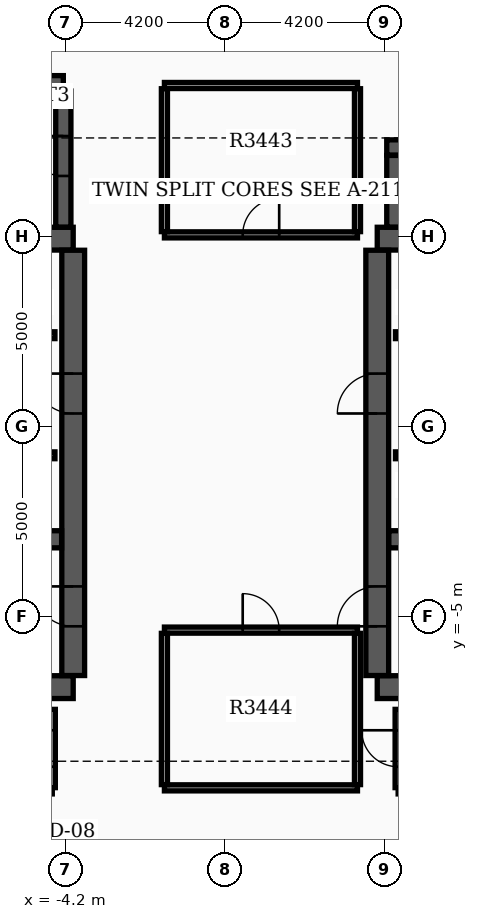
"""IFC4 building model, lengths in metres.
Left out: names, types, materials, properties, quantities, classifications, styles, units other than length and angle.
Written with IfcOpenShell. Run it as: python <this file> out.ifc"""

import sys

from ifc_helpers import new_model, si_unit, direction, frame, frame_2d, origin, place, context, subcontext, project, spatial, rectangle, extrude, element, fill, save


model = new_model("IFC4")
c1 = context("Model", 3, precision=1e-05, world=origin(), true_north=direction((0.0, 1.0)))
c2 = subcontext(c1, "Body", "Model", "MODEL_VIEW")
j1 = project(units=[si_unit("LENGTHUNIT", "METRE"), si_unit("PLANEANGLEUNIT", "RADIAN")], contexts=[c1])
p1 = place(None, origin())
s1 = spatial("IfcSite", under=j1, at=p1, CompositionType="ELEMENT")
p2 = place(p1, origin())
s2 = spatial("IfcBuilding", under=s1, at=p2, CompositionType="ELEMENT")
p3 = place(p2, frame((0.0, 0.0, 216.9)))
s3 = spatial("IfcBuildingStorey", under=s2, at=p3, CompositionType="ELEMENT", Elevation=216.9)
for number, where, z_axis, x_axis in (
    (1, (-12.4, -6.85, 0.0), (0.0, 0.0, 1.0), (1.0, 0.0, 0.0)),
    (2, (-12.4, 4.95, 0.0), (0.0, 0.0, 1.0), (1.0, 0.0, 0.0)),
):
    element("IfcWall", number, at=place(p3, frame(where, z_axis=z_axis, x_axis=x_axis)), inside=s3, PredefinedType="SHEAR", context=c2, shape_type="SweptSolid", body=[
        extrude(rectangle(XDim=8.4, YDim=0.6, at=frame_2d((4.2, 0.0))), origin(), (0.0, 0.0, 1.0), 3.7),
    ])
p4 = place(p3, frame((-4.0, -6.545, 0.0), z_axis=(0.0, 0.0, 1.0), x_axis=(0.0, 1.0, 0.0)))
e3 = element("IfcWall", 3, at=p4, inside=s3, PredefinedType="SHEAR", context=c2, shape_type="SweptSolid", body=[
    extrude(rectangle(XDim=11.19, YDim=0.6, at=frame_2d((5.595, 0.0))), origin(), (0.0, 0.0, 1.0), 3.7),
])
p5 = place(p4, frame((1.295, 0.0, 0.0)))
e4 = element("IfcOpeningElement", 4, at=p5, cuts=e3, PredefinedType="OPENING", context=c2, shape_type="SweptSolid", body=[
    extrude(rectangle(XDim=1.05, YDim=2.15, at=frame_2d((0.525, 1.075))), frame((0.0, 0.31, 0.0), z_axis=(0.0, -1.0, 0.0), x_axis=(1.0, 0.0, 0.0)), (0.0, 0.0, 1.0), 0.62),
])
p6 = place(p4, frame((6.895, 0.0, 0.0)))
e5 = element("IfcOpeningElement", 5, at=p6, cuts=e3, PredefinedType="OPENING", context=c2, shape_type="SweptSolid", body=[
    extrude(rectangle(XDim=1.05, YDim=2.15, at=frame_2d((0.525, 1.075))), frame((0.0, 0.31, 0.0), z_axis=(0.0, -1.0, 0.0), x_axis=(1.0, 0.0, 0.0)), (0.0, 0.0, 1.0), 0.62),
])
p7 = place(p3, frame((-12.095, -2.96, 0.0), z_axis=(0.0, 0.0, 1.0), x_axis=(1.0, 0.0, 0.0)))
e6 = element("IfcWall", 6, at=p7, inside=s3, PredefinedType="SHEAR", context=c2, shape_type="SweptSolid", body=[
    extrude(rectangle(XDim=7.79, YDim=0.45, at=frame_2d((3.895, 0.0))), origin(), (0.0, 0.0, 1.0), 3.7),
])
for number, where, z_axis, x_axis in (
    (7, (4.0, -6.85, 0.0), (0.0, 0.0, 1.0), (1.0, 0.0, 0.0)),
    (8, (4.0, 4.95, 0.0), (0.0, 0.0, 1.0), (1.0, 0.0, 0.0)),
):
    element("IfcWall", number, at=place(p3, frame(where, z_axis=z_axis, x_axis=x_axis)), inside=s3, PredefinedType="SHEAR", context=c2, shape_type="SweptSolid", body=[
        extrude(rectangle(XDim=8.4, YDim=0.6, at=frame_2d((4.2, 0.0))), origin(), (0.0, 0.0, 1.0), 3.7),
    ])
p8 = place(p3, frame((4.0, -6.545, 0.0), z_axis=(0.0, 0.0, 1.0), x_axis=(0.0, 1.0, 0.0)))
e9 = element("IfcWall", 9, at=p8, inside=s3, PredefinedType="SHEAR", context=c2, shape_type="SweptSolid", body=[
    extrude(rectangle(XDim=11.19, YDim=0.6, at=frame_2d((5.595, 0.0))), origin(), (0.0, 0.0, 1.0), 3.7),
])
p9 = place(p8, frame((1.295, 0.0, 0.0)))
e10 = element("IfcOpeningElement", 10, at=p9, cuts=e9, PredefinedType="OPENING", context=c2, shape_type="SweptSolid", body=[
    extrude(rectangle(XDim=1.05, YDim=2.15, at=frame_2d((0.525, 1.075))), frame((0.0, 0.31, 0.0), z_axis=(0.0, -1.0, 0.0), x_axis=(1.0, 0.0, 0.0)), (0.0, 0.0, 1.0), 0.62),
])
p10 = place(p8, frame((6.895, 0.0, 0.0)))
e11 = element("IfcOpeningElement", 11, at=p10, cuts=e9, PredefinedType="OPENING", context=c2, shape_type="SweptSolid", body=[
    extrude(rectangle(XDim=1.05, YDim=2.15, at=frame_2d((0.525, 1.075))), frame((0.0, 0.31, 0.0), z_axis=(0.0, -1.0, 0.0), x_axis=(1.0, 0.0, 0.0)), (0.0, 0.0, 1.0), 0.62),
])
p11 = place(p3, frame((4.305, -2.96, 0.0), z_axis=(0.0, 0.0, 1.0), x_axis=(1.0, 0.0, 0.0)))
e12 = element("IfcWall", 12, at=p11, inside=s3, PredefinedType="SHEAR", context=c2, shape_type="SweptSolid", body=[
    extrude(rectangle(XDim=7.79, YDim=0.45, at=frame_2d((3.895, 0.0))), origin(), (0.0, 0.0, 1.0), 3.7),
])
p12 = place(p3, frame((-12.22, 9.04, 0.0), z_axis=(0.0, 0.0, 1.0), x_axis=(1.0, 0.0, 0.0)))
e13 = element("IfcWall", 13, at=p12, inside=s3, PredefinedType="SHEAR", context=c2, shape_type="SweptSolid", body=[
    extrude(rectangle(XDim=7.96, YDim=0.4, at=frame_2d((3.98, 0.0))), origin(), (0.0, 0.0, 1.0), 3.7),
])
p13 = place(p3, frame((-4.26, 5.255, 0.0), z_axis=(0.0, 0.0, 1.0), x_axis=(0.0, 1.0, 0.0)))
e14 = element("IfcWall", 14, at=p13, inside=s3, PredefinedType="SHEAR", context=c2, shape_type="SweptSolid", body=[
    extrude(rectangle(XDim=3.58, YDim=0.4, at=frame_2d((1.79, 0.0))), origin(), (0.0, 0.0, 1.0), 3.7),
])
p14 = place(p13, frame((1.345, 0.0, 0.0)))
e15 = element("IfcOpeningElement", 15, at=p14, cuts=e14, PredefinedType="OPENING", context=c2, shape_type="SweptSolid", body=[
    extrude(rectangle(XDim=1.05, YDim=2.15, at=frame_2d((0.525, 1.075))), frame((0.0, 0.21, 0.0), z_axis=(0.0, -1.0, 0.0), x_axis=(1.0, 0.0, 0.0)), (0.0, 0.0, 1.0), 0.42),
])
p15 = place(p3, frame((4.45, 5.255, 0.0), z_axis=(0.0, 0.0, 1.0), x_axis=(0.0, 1.0, 0.0)))
e16 = element("IfcWall", 16, at=p15, inside=s3, PredefinedType="SHEAR", context=c2, shape_type="SweptSolid", body=[
    extrude(rectangle(XDim=1.885, YDim=0.4, at=frame_2d((0.942, 0.0))), origin(), (0.0, 0.0, 1.0), 3.7),
])
p16 = place(p3, frame((4.25, 7.35, 0.0), z_axis=(0.0, 0.0, 1.0), x_axis=(1.0, 0.0, 0.0)))
e17 = element("IfcWall", 17, at=p16, inside=s3, PredefinedType="SHEAR", context=c2, shape_type="SweptSolid", body=[
    extrude(rectangle(XDim=5.4, YDim=0.4, at=frame_2d((2.7, 0.0))), origin(), (0.0, 0.0, 1.0), 3.7),
])
p17 = place(p3, frame((-11.9, 2.41, 0.0), z_axis=(0.0, 0.0, 1.0), x_axis=(1.0, 0.0, 0.0)))
e18 = element("IfcWall", 18, at=p17, inside=s3, PredefinedType="SOLIDWALL", context=c2, shape_type="SweptSolid", body=[
    extrude(rectangle(XDim=7.42, YDim=0.18, at=frame_2d((3.71, 0.0))), origin(), (0.0, 0.0, 1.0), 3.17),
])
p18 = place(p17, frame((0.55, 0.0, 0.0)))
e19 = element("IfcOpeningElement", 19, at=p18, cuts=e18, PredefinedType="OPENING", context=c2, shape_type="SweptSolid", body=[
    extrude(rectangle(XDim=1.1, YDim=2.15, at=frame_2d((0.55, 1.075))), frame((0.0, 0.1, 0.0), z_axis=(0.0, -1.0, 0.0), x_axis=(1.0, 0.0, 0.0)), (0.0, 0.0, 1.0), 0.2),
])
p19 = place(p17, frame((4.9, 0.0, 0.0)))
e20 = element("IfcOpeningElement", 20, at=p19, cuts=e18, PredefinedType="OPENING", context=c2, shape_type="SweptSolid", body=[
    extrude(rectangle(XDim=0.88, YDim=2.1, at=frame_2d((0.44, 1.05))), frame((0.0, 0.1, 0.0), z_axis=(0.0, -1.0, 0.0), x_axis=(1.0, 0.0, 0.0)), (0.0, 0.0, 1.0), 0.2),
])
p20 = place(p3, frame((4.48, 2.41, 0.0), z_axis=(0.0, 0.0, 1.0), x_axis=(1.0, 0.0, 0.0)))
e21 = element("IfcWall", 21, at=p20, inside=s3, PredefinedType="SOLIDWALL", context=c2, shape_type="SweptSolid", body=[
    extrude(rectangle(XDim=7.42, YDim=0.18, at=frame_2d((3.71, 0.0))), origin(), (0.0, 0.0, 1.0), 3.17),
])
p21 = place(p20, frame((5.67, 0.0, 0.0)))
e22 = element("IfcOpeningElement", 22, at=p21, cuts=e21, PredefinedType="OPENING", context=c2, shape_type="SweptSolid", body=[
    extrude(rectangle(XDim=1.1, YDim=2.15, at=frame_2d((0.55, 1.075))), frame((0.0, 0.1, 0.0), z_axis=(0.0, -1.0, 0.0), x_axis=(1.0, 0.0, 0.0)), (0.0, 0.0, 1.0), 0.2),
])
p22 = place(p20, frame((1.6, 0.0, 0.0)))
e23 = element("IfcOpeningElement", 23, at=p22, cuts=e21, PredefinedType="OPENING", context=c2, shape_type="SweptSolid", body=[
    extrude(rectangle(XDim=0.88, YDim=2.1, at=frame_2d((0.44, 1.05))), frame((0.0, 0.1, 0.0), z_axis=(0.0, -1.0, 0.0), x_axis=(1.0, 0.0, 0.0)), (0.0, 0.0, 1.0), 0.2),
])
p23 = place(p3, frame((-11.9, -0.75, 0.0), z_axis=(0.0, 0.0, 1.0), x_axis=(1.0, 0.0, 0.0)))
e24 = element("IfcWall", 24, at=p23, inside=s3, PredefinedType="SOLIDWALL", context=c2, shape_type="SweptSolid", body=[
    extrude(rectangle(XDim=7.42, YDim=0.18, at=frame_2d((3.71, 0.0))), origin(), (0.0, 0.0, 1.0), 3.17),
])
p24 = place(p23, frame((5.75, 0.0, 0.0)))
e25 = element("IfcOpeningElement", 25, at=p24, cuts=e24, PredefinedType="OPENING", context=c2, shape_type="SweptSolid", body=[
    extrude(rectangle(XDim=1.1, YDim=2.15, at=frame_2d((0.55, 1.075))), frame((0.0, 0.1, 0.0), z_axis=(0.0, -1.0, 0.0), x_axis=(1.0, 0.0, 0.0)), (0.0, 0.0, 1.0), 0.2),
])
p25 = place(p23, frame((1.6, 0.0, 0.0)))
e26 = element("IfcOpeningElement", 26, at=p25, cuts=e24, PredefinedType="OPENING", context=c2, shape_type="SweptSolid", body=[
    extrude(rectangle(XDim=0.88, YDim=2.1, at=frame_2d((0.44, 1.05))), frame((0.0, 0.1, 0.0), z_axis=(0.0, -1.0, 0.0), x_axis=(1.0, 0.0, 0.0)), (0.0, 0.0, 1.0), 0.2),
])
p26 = place(p3, frame((4.48, -0.75, 0.0), z_axis=(0.0, 0.0, 1.0), x_axis=(1.0, 0.0, 0.0)))
e27 = element("IfcWall", 27, at=p26, inside=s3, PredefinedType="SOLIDWALL", context=c2, shape_type="SweptSolid", body=[
    extrude(rectangle(XDim=7.42, YDim=0.18, at=frame_2d((3.71, 0.0))), origin(), (0.0, 0.0, 1.0), 3.17),
])
p27 = place(p26, frame((3.92, 0.0, 0.0)))
e28 = element("IfcOpeningElement", 28, at=p27, cuts=e27, PredefinedType="OPENING", context=c2, shape_type="SweptSolid", body=[
    extrude(rectangle(XDim=1.1, YDim=2.15, at=frame_2d((0.55, 1.075))), frame((0.0, 0.1, 0.0), z_axis=(0.0, -1.0, 0.0), x_axis=(1.0, 0.0, 0.0)), (0.0, 0.0, 1.0), 0.2),
])
p28 = place(p26, frame((5.82, 0.0, 0.0)))
e29 = element("IfcOpeningElement", 29, at=p28, cuts=e27, PredefinedType="OPENING", context=c2, shape_type="SweptSolid", body=[
    extrude(rectangle(XDim=1.1, YDim=2.15, at=frame_2d((0.55, 1.075))), frame((0.0, 0.1, 0.0), z_axis=(0.0, -1.0, 0.0), x_axis=(1.0, 0.0, 0.0)), (0.0, 0.0, 1.0), 0.2),
])
p29 = place(p26, frame((1.6, 0.0, 0.0)))
e30 = element("IfcOpeningElement", 30, at=p29, cuts=e27, PredefinedType="OPENING", context=c2, shape_type="SweptSolid", body=[
    extrude(rectangle(XDim=0.88, YDim=2.1, at=frame_2d((0.44, 1.05))), frame((0.0, 0.1, 0.0), z_axis=(0.0, -1.0, 0.0), x_axis=(1.0, 0.0, 0.0)), (0.0, 0.0, 1.0), 0.2),
])
p30 = place(p3, frame((-1.6, 5.05, 0.0), z_axis=(0.0, 0.0, 1.0), x_axis=(1.0, 0.0, 0.0)))
e31 = element("IfcWall", 31, at=p30, inside=s3, PredefinedType="PARTITIONING", context=c2, shape_type="SweptSolid", body=[
    extrude(rectangle(XDim=5.08, YDim=0.16, at=frame_2d((2.54, 0.0))), origin(), (0.0, 0.0, 1.0), 3.17),
])
p31 = place(p30, frame((2.06, 0.0, 0.0)))
e32 = element("IfcOpeningElement", 32, at=p31, cuts=e31, PredefinedType="OPENING", context=c2, shape_type="SweptSolid", body=[
    extrude(rectangle(XDim=0.96, YDim=2.15, at=frame_2d((0.48, 1.075))), frame((0.0, 0.09, 0.0), z_axis=(0.0, -1.0, 0.0), x_axis=(1.0, 0.0, 0.0)), (0.0, 0.0, 1.0), 0.18),
])
p32 = place(p3, frame((-1.6, 8.98, 0.0), z_axis=(0.0, 0.0, 1.0), x_axis=(1.0, 0.0, 0.0)))
e33 = element("IfcWall", 33, at=p32, inside=s3, PredefinedType="PARTITIONING", context=c2, shape_type="SweptSolid", body=[
    extrude(rectangle(XDim=5.08, YDim=0.16, at=frame_2d((2.54, 0.0))), origin(), (0.0, 0.0, 1.0), 3.17),
])
for number, where, z_axis, x_axis in (
    (34, (-1.6, 5.135, 0.0), (0.0, 0.0, 1.0), (0.0, 1.0, 0.0)),
    (35, (3.48, 5.135, 0.0), (0.0, 0.0, 1.0), (0.0, 1.0, 0.0)),
):
    element("IfcWall", number, at=place(p3, frame(where, z_axis=z_axis, x_axis=x_axis)), inside=s3, PredefinedType="PARTITIONING", context=c2, shape_type="SweptSolid", body=[
        extrude(rectangle(XDim=3.76, YDim=0.16, at=frame_2d((1.88, 0.0))), origin(), (0.0, 0.0, 1.0), 3.17),
    ])
p33 = place(p3, frame((-1.6, -9.5, 0.0), z_axis=(0.0, 0.0, 1.0), x_axis=(1.0, 0.0, 0.0)))
e36 = element("IfcWall", 36, at=p33, inside=s3, PredefinedType="PARTITIONING", context=c2, shape_type="SweptSolid", body=[
    extrude(rectangle(XDim=5.08, YDim=0.16, at=frame_2d((2.54, 0.0))), origin(), (0.0, 0.0, 1.0), 3.17),
])
p34 = place(p3, frame((-1.6, -5.35, 0.0), z_axis=(0.0, 0.0, 1.0), x_axis=(1.0, 0.0, 0.0)))
e37 = element("IfcWall", 37, at=p34, inside=s3, PredefinedType="PARTITIONING", context=c2, shape_type="SweptSolid", body=[
    extrude(rectangle(XDim=5.08, YDim=0.16, at=frame_2d((2.54, 0.0))), origin(), (0.0, 0.0, 1.0), 3.17),
])
p35 = place(p34, frame((2.06, 0.0, 0.0)))
e38 = element("IfcOpeningElement", 38, at=p35, cuts=e37, PredefinedType="OPENING", context=c2, shape_type="SweptSolid", body=[
    extrude(rectangle(XDim=0.96, YDim=2.15, at=frame_2d((0.48, 1.075))), frame((0.0, 0.09, 0.0), z_axis=(0.0, -1.0, 0.0), x_axis=(1.0, 0.0, 0.0)), (0.0, 0.0, 1.0), 0.18),
])
for number, where, z_axis, x_axis in (
    (39, (-1.6, -9.415, 0.0), (0.0, 0.0, 1.0), (0.0, 1.0, 0.0)),
    (40, (3.48, -9.415, 0.0), (0.0, 0.0, 1.0), (0.0, 1.0, 0.0)),
):
    element("IfcWall", number, at=place(p3, frame(where, z_axis=z_axis, x_axis=x_axis)), inside=s3, PredefinedType="PARTITIONING", context=c2, shape_type="SweptSolid", body=[
        extrude(rectangle(XDim=3.98, YDim=0.16, at=frame_2d((1.99, 0.0))), origin(), (0.0, 0.0, 1.0), 3.17),
    ])
p36 = place(p3, frame((4.55, -9.58, 0.0), z_axis=(0.0, 0.0, 1.0), x_axis=(1.0, 0.0, 0.0)))
e41 = element("IfcWall", 41, at=p36, inside=s3, PredefinedType="PARTITIONING", context=c2, shape_type="SweptSolid", body=[
    extrude(rectangle(XDim=8.1, YDim=0.16, at=frame_2d((4.05, 0.0))), origin(), (0.0, 0.0, 1.0), 3.17),
])
p37 = place(p3, frame((4.55, -9.495, 0.0), z_axis=(0.0, 0.0, 1.0), x_axis=(0.0, 1.0, 0.0)))
e42 = element("IfcWall", 42, at=p37, inside=s3, PredefinedType="PARTITIONING", context=c2, shape_type="SweptSolid", body=[
    extrude(rectangle(XDim=2.06, YDim=0.16, at=frame_2d((1.03, 0.0))), origin(), (0.0, 0.0, 1.0), 3.17),
])
p38 = place(p37, frame((0.55, 0.0, 0.0)))
e43 = element("IfcOpeningElement", 43, at=p38, cuts=e42, PredefinedType="OPENING", context=c2, shape_type="SweptSolid", body=[
    extrude(rectangle(XDim=0.96, YDim=2.15, at=frame_2d((0.48, 1.075))), frame((0.0, 0.09, 0.0), z_axis=(0.0, -1.0, 0.0), x_axis=(1.0, 0.0, 0.0)), (0.0, 0.0, 1.0), 0.18),
])
p39 = place(p3, frame((-4.55, -9.495, 0.0), z_axis=(0.0, 0.0, 1.0), x_axis=(0.0, 1.0, 0.0)))
e44 = element("IfcWall", 44, at=p39, inside=s3, PredefinedType="PARTITIONING", context=c2, shape_type="SweptSolid", body=[
    extrude(rectangle(XDim=2.06, YDim=0.16, at=frame_2d((1.03, 0.0))), origin(), (0.0, 0.0, 1.0), 3.17),
])
p40 = place(p39, frame((0.55, 0.0, 0.0)))
e45 = element("IfcOpeningElement", 45, at=p40, cuts=e44, PredefinedType="OPENING", context=c2, shape_type="SweptSolid", body=[
    extrude(rectangle(XDim=0.96, YDim=2.15, at=frame_2d((0.48, 1.075))), frame((0.0, 0.09, 0.0), z_axis=(0.0, -1.0, 0.0), x_axis=(1.0, 0.0, 0.0)), (0.0, 0.0, 1.0), 0.18),
])
p41 = place(p5, origin())
e46 = element("IfcDoor", 46, at=p41, inside=s3, OperationType="SINGLE_SWING_RIGHT", PredefinedType="DOOR", context=c2, shape_type="SweptSolid", body=[
    extrude(rectangle(XDim=1.05, YDim=2.15, at=frame_2d((0.525, 1.075))), frame((0.0, 0.025, 0.0), z_axis=(0.0, -1.0, 0.0), x_axis=(1.0, 0.0, 0.0)), (0.0, 0.0, 1.0), 0.05),
])
fill(e4, e46)
p42 = place(p9, origin())
e47 = element("IfcDoor", 47, at=p42, inside=s3, OperationType="SINGLE_SWING_LEFT", PredefinedType="DOOR", context=c2, shape_type="SweptSolid", body=[
    extrude(rectangle(XDim=1.05, YDim=2.15, at=frame_2d((0.525, 1.075))), frame((0.0, 0.025, 0.0), z_axis=(0.0, -1.0, 0.0), x_axis=(1.0, 0.0, 0.0)), (0.0, 0.0, 1.0), 0.05),
])
fill(e10, e47)
p43 = place(p6, origin())
e48 = element("IfcDoor", 48, at=p43, inside=s3, OperationType="SINGLE_SWING_RIGHT", PredefinedType="DOOR", context=c2, shape_type="SweptSolid", body=[
    extrude(rectangle(XDim=1.05, YDim=2.15, at=frame_2d((0.525, 1.075))), frame((0.0, 0.025, 0.0), z_axis=(0.0, -1.0, 0.0), x_axis=(1.0, 0.0, 0.0)), (0.0, 0.0, 1.0), 0.05),
])
fill(e5, e48)
p44 = place(p10, origin())
e49 = element("IfcDoor", 49, at=p44, inside=s3, OperationType="SINGLE_SWING_LEFT", PredefinedType="DOOR", context=c2, shape_type="SweptSolid", body=[
    extrude(rectangle(XDim=1.05, YDim=2.15, at=frame_2d((0.525, 1.075))), frame((0.0, 0.025, 0.0), z_axis=(0.0, -1.0, 0.0), x_axis=(1.0, 0.0, 0.0)), (0.0, 0.0, 1.0), 0.05),
])
fill(e11, e49)
p45 = place(p14, origin())
e50 = element("IfcDoor", 50, at=p45, inside=s3, OperationType="SINGLE_SWING_RIGHT", PredefinedType="DOOR", context=c2, shape_type="SweptSolid", body=[
    extrude(rectangle(XDim=1.05, YDim=2.15, at=frame_2d((0.525, 1.075))), frame((0.0, 0.025, 0.0), z_axis=(0.0, -1.0, 0.0), x_axis=(1.0, 0.0, 0.0)), (0.0, 0.0, 1.0), 0.05),
])
fill(e15, e50)
p46 = place(p31, origin())
e51 = element("IfcDoor", 51, at=p46, inside=s3, OperationType="SINGLE_SWING_RIGHT", PredefinedType="DOOR", context=c2, shape_type="SweptSolid", body=[
    extrude(rectangle(XDim=0.96, YDim=2.15, at=frame_2d((0.48, 1.075))), frame((0.0, 0.025, 0.0), z_axis=(0.0, -1.0, 0.0), x_axis=(1.0, 0.0, 0.0)), (0.0, 0.0, 1.0), 0.05),
])
fill(e32, e51)
p47 = place(p35, origin())
e52 = element("IfcDoor", 52, at=p47, inside=s3, OperationType="SINGLE_SWING_LEFT", PredefinedType="DOOR", context=c2, shape_type="SweptSolid", body=[
    extrude(rectangle(XDim=0.96, YDim=2.15, at=frame_2d((0.48, 1.075))), frame((0.0, 0.025, 0.0), z_axis=(0.0, -1.0, 0.0), x_axis=(1.0, 0.0, 0.0)), (0.0, 0.0, 1.0), 0.05),
])
fill(e38, e52)
p48 = place(p38, origin())
e53 = element("IfcDoor", 53, at=p48, inside=s3, OperationType="SINGLE_SWING_RIGHT", PredefinedType="DOOR", context=c2, shape_type="SweptSolid", body=[
    extrude(rectangle(XDim=0.96, YDim=2.15, at=frame_2d((0.48, 1.075))), frame((0.0, 0.025, 0.0), z_axis=(0.0, -1.0, 0.0), x_axis=(1.0, 0.0, 0.0)), (0.0, 0.0, 1.0), 0.05),
])
fill(e43, e53)
p49 = place(p40, origin())
e54 = element("IfcDoor", 54, at=p49, inside=s3, OperationType="SINGLE_SWING_LEFT", PredefinedType="DOOR", context=c2, shape_type="SweptSolid", body=[
    extrude(rectangle(XDim=0.96, YDim=2.15, at=frame_2d((0.48, 1.075))), frame((0.0, 0.025, 0.0), z_axis=(0.0, -1.0, 0.0), x_axis=(1.0, 0.0, 0.0)), (0.0, 0.0, 1.0), 0.05),
])
fill(e45, e54)
save(model, sys.argv[1])
